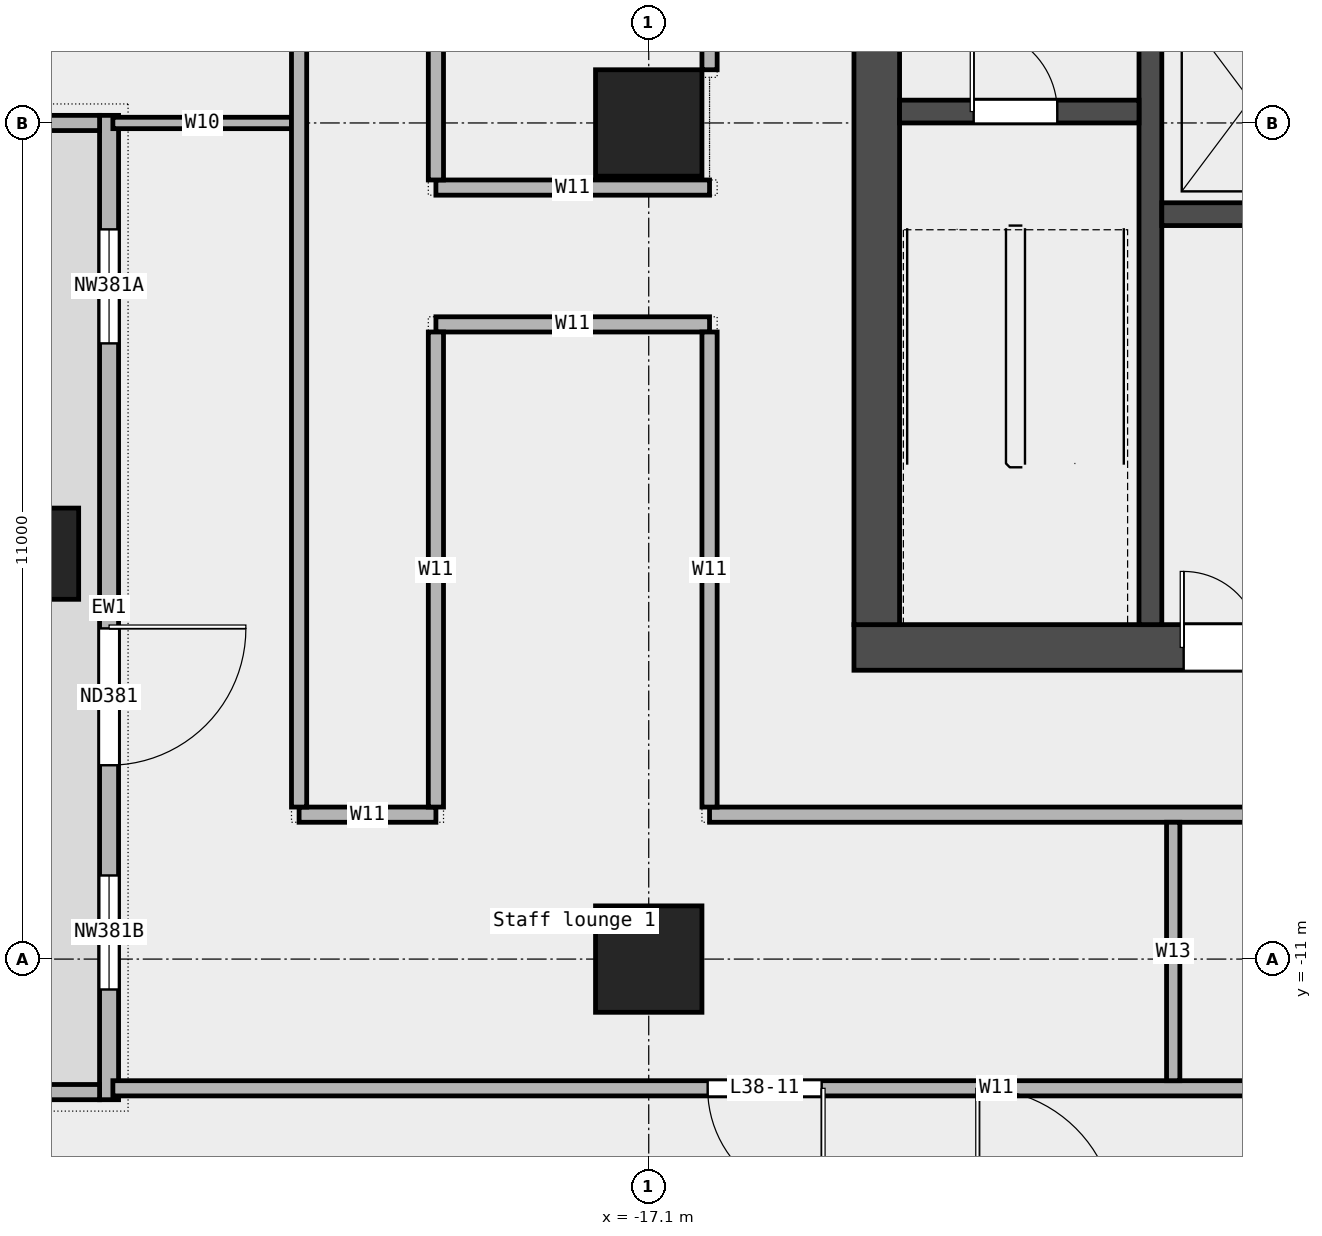
"""IFC4 building model, lengths in metres.
Left out: names, types, materials, properties, quantities, classifications, styles, units other than length and angle.
Written with IfcOpenShell. Run it as: python <this file> out.ifc"""

import sys

from ifc_helpers import new_model, si_unit, direction, frame, frame_2d, origin, origin_2d, place, context, subcontext, project, spatial, rectangle, extrude, element, fill, save


model = new_model("IFC4")
c1 = context("Model", 3, precision=1e-05, world=origin(), true_north=direction((0.0, 1.0)))
c2 = subcontext(c1, "Body", "Model", "MODEL_VIEW")
j1 = project(units=[si_unit("LENGTHUNIT", "METRE"), si_unit("PLANEANGLEUNIT", "RADIAN")], contexts=[c1])
p1 = place(None, origin())
s1 = spatial("IfcSite", under=j1, at=p1, CompositionType="ELEMENT")
p2 = place(p1, origin())
s2 = spatial("IfcBuilding", under=s1, at=p2, CompositionType="ELEMENT")
p3 = place(p2, frame((0.0, 0.0, 185.0)))
s3 = spatial("IfcBuildingStorey", under=s2, at=p3, CompositionType="ELEMENT", Elevation=185.0)
p4 = place(p3, frame((-25.2, -5.667, 0.0), z_axis=(0.0, 0.0, 1.0), x_axis=(1.0, 0.0, 0.0)))
e1 = element("IfcColumn", 1, at=p4, inside=s3, PredefinedType="COLUMN", context=c2, shape_type="SweptSolid", body=[
    extrude(rectangle(XDim=1.2, YDim=1.2, at=origin_2d()), origin(), (0.0, 0.0, 1.0), 3.6),
])
for number, where, z_axis, x_axis in (
    (2, (-17.1, -11.0, 0.0), (0.0, 0.0, 1.0), (1.0, 0.0, 0.0)),
    (3, (-17.1, 0.0, 0.0), (0.0, 0.0, 1.0), (1.0, 0.0, 0.0)),
):
    element("IfcColumn", number, at=place(p3, frame(where, z_axis=z_axis, x_axis=x_axis)), inside=s3, PredefinedType="COLUMN", context=c2, shape_type="SweptSolid", body=[
        extrude(rectangle(XDim=1.4, YDim=1.4, at=origin_2d()), origin(), (0.0, 0.0, 1.0), 3.6),
    ])
p5 = place(p3, frame((-24.2, 0.1, 0.0), z_axis=(0.0, 0.0, 1.0), x_axis=(0.0, -1.0, 0.0)))
e4 = element("IfcWall", 4, at=p5, inside=s3, PredefinedType="STANDARD", context=c2, shape_type="SweptSolid", body=[
    extrude(rectangle(XDim=12.95, YDim=0.25, at=frame_2d((6.475, 0.0))), origin(), (0.0, 0.0, 1.0), 3.6),
])
p6 = place(p5, frame((1.5, 0.0, 0.45)))
e5 = element("IfcOpeningElement", 5, at=p6, cuts=e4, PredefinedType="OPENING", context=c2, shape_type="SweptSolid", body=[
    extrude(rectangle(XDim=1.5, YDim=2.4, at=frame_2d((0.75, 1.2))), frame((0.0, 0.137, 0.0), z_axis=(0.0, -1.0, 0.0), x_axis=(1.0, 0.0, 0.0)), (0.0, 0.0, 1.0), 0.274),
])
p7 = place(p5, frame((6.75, 0.0, 0.0)))
e6 = element("IfcOpeningElement", 6, at=p7, cuts=e4, PredefinedType="OPENING", context=c2, shape_type="SweptSolid", body=[
    extrude(rectangle(XDim=1.8, YDim=2.4, at=frame_2d((0.9, 1.2))), frame((0.0, 0.137, 0.0), z_axis=(0.0, -1.0, 0.0), x_axis=(1.0, 0.0, 0.0)), (0.0, 0.0, 1.0), 0.274),
])
p8 = place(p5, frame((10.0, 0.0, 0.45)))
e7 = element("IfcOpeningElement", 7, at=p8, cuts=e4, PredefinedType="OPENING", context=c2, shape_type="SweptSolid", body=[
    extrude(rectangle(XDim=1.5, YDim=2.4, at=frame_2d((0.75, 1.2))), frame((0.0, 0.137, 0.0), z_axis=(0.0, -1.0, 0.0), x_axis=(1.0, 0.0, 0.0)), (0.0, 0.0, 1.0), 0.274),
])
for number, where, z_axis, x_axis in (
    (8, (-26.2, 0.0, 0.0), (0.0, 0.0, 1.0), (1.0, 0.0, 0.0)),
    (9, (-26.2, -12.75, 0.0), (0.0, 0.0, 1.0), (1.0, 0.0, 0.0)),
):
    element("IfcWall", number, at=place(p3, frame(where, z_axis=z_axis, x_axis=x_axis)), inside=s3, PredefinedType="STANDARD", context=c2, shape_type="SweptSolid", body=[
        extrude(rectangle(XDim=1.875, YDim=0.2, at=frame_2d((0.938, 0.0))), origin(), (0.0, 0.0, 1.0), 3.6),
    ])
p9 = place(p3, frame((-24.15, -12.7, 0.0), z_axis=(0.0, 0.0, 1.0), x_axis=(1.0, 0.0, 0.0)))
e10 = element("IfcWall", 10, at=p9, inside=s3, PredefinedType="PARTITIONING", context=c2, shape_type="SweptSolid", body=[
    extrude(rectangle(XDim=23.25, YDim=0.2, at=frame_2d((11.625, 0.0))), origin(), (0.0, 0.0, 1.0), 3.6),
])
p10 = place(p9, frame((19.35, 0.0, 0.0)))
e11 = element("IfcOpeningElement", 11, at=p10, cuts=e10, PredefinedType="OPENING", context=c2, shape_type="SweptSolid", body=[
    extrude(rectangle(XDim=0.9, YDim=2.1, at=frame_2d((0.45, 1.05))), frame((0.0, 0.112, 0.0), z_axis=(0.0, -1.0, 0.0), x_axis=(1.0, 0.0, 0.0)), (0.0, 0.0, 1.0), 0.224),
])
p11 = place(p9, frame((7.825, 0.0, 0.0)))
e12 = element("IfcOpeningElement", 12, at=p11, cuts=e10, PredefinedType="OPENING", context=c2, shape_type="SweptSolid", body=[
    extrude(rectangle(XDim=1.5, YDim=2.1, at=frame_2d((0.75, 1.05))), frame((0.0, 0.112, 0.0), z_axis=(0.0, -1.0, 0.0), x_axis=(1.0, 0.0, 0.0)), (0.0, 0.0, 1.0), 0.224),
])
p12 = place(p3, frame((-21.7, -9.1, 0.0), z_axis=(0.0, 0.0, 1.0), x_axis=(1.0, 0.0, 0.0)))
e13 = element("IfcWall", 13, at=p12, inside=s3, PredefinedType="PARTITIONING", context=c2, shape_type="SweptSolid", body=[
    extrude(rectangle(XDim=1.8, YDim=0.2, at=frame_2d((0.9, 0.0))), origin(), (0.0, 0.0, 1.0), 3.6),
])
p13 = place(p3, frame((-16.3, -9.1, 0.0), z_axis=(0.0, 0.0, 1.0), x_axis=(1.0, 0.0, 0.0)))
e14 = element("IfcWall", 14, at=p13, inside=s3, PredefinedType="PARTITIONING", context=c2, shape_type="SweptSolid", body=[
    extrude(rectangle(XDim=15.4, YDim=0.2, at=frame_2d((7.7, 0.0))), origin(), (0.0, 0.0, 1.0), 3.6),
])
for number, where, z_axis, x_axis in (
    (15, (-19.9, -2.65, 0.0), (0.0, 0.0, 1.0), (1.0, 0.0, 0.0)),
    (16, (-19.9, -0.85, 0.0), (0.0, 0.0, 1.0), (1.0, 0.0, 0.0)),
):
    element("IfcWall", number, at=place(p3, frame(where, z_axis=z_axis, x_axis=x_axis)), inside=s3, PredefinedType="PARTITIONING", context=c2, shape_type="SweptSolid", body=[
        extrude(rectangle(XDim=3.6, YDim=0.2, at=frame_2d((1.8, 0.0))), origin(), (0.0, 0.0, 1.0), 3.6),
    ])
p14 = place(p3, frame((-24.15, 0.0, 0.0), z_axis=(0.0, 0.0, 1.0), x_axis=(1.0, 0.0, 0.0)))
e17 = element("IfcWall", 17, at=p14, inside=s3, PredefinedType="PARTITIONING", context=c2, shape_type="SweptSolid", body=[
    extrude(rectangle(XDim=2.35, YDim=0.15, at=frame_2d((1.175, 0.0))), origin(), (0.0, 0.0, 1.0), 3.6),
])
p15 = place(p3, frame((-21.7, -9.0, 0.0), z_axis=(0.0, 0.0, 1.0), x_axis=(0.0, 1.0, 0.0)))
e18 = element("IfcWall", 18, at=p15, inside=s3, PredefinedType="PARTITIONING", context=c2, shape_type="SweptSolid", body=[
    extrude(rectangle(XDim=24.3, YDim=0.2, at=frame_2d((12.15, 0.0))), origin(), (0.0, 0.0, 1.0), 3.6),
])
p16 = place(p15, frame((16.05, 0.0, 0.0)))
e19 = element("IfcOpeningElement", 19, at=p16, cuts=e18, PredefinedType="OPENING", context=c2, shape_type="SweptSolid", body=[
    extrude(rectangle(XDim=1.2, YDim=2.1, at=frame_2d((0.6, 1.05))), frame((0.0, 0.112, 0.0), z_axis=(0.0, -1.0, 0.0), x_axis=(1.0, 0.0, 0.0)), (0.0, 0.0, 1.0), 0.224),
])
p17 = place(p3, frame((-19.9, -9.0, 0.0), z_axis=(0.0, 0.0, 1.0), x_axis=(0.0, 1.0, 0.0)))
e20 = element("IfcWall", 20, at=p17, inside=s3, PredefinedType="PARTITIONING", context=c2, shape_type="SweptSolid", body=[
    extrude(rectangle(XDim=6.25, YDim=0.2, at=frame_2d((3.125, 0.0))), origin(), (0.0, 0.0, 1.0), 3.6),
])
p18 = place(p3, frame((-19.9, -0.75, 0.0), z_axis=(0.0, 0.0, 1.0), x_axis=(0.0, 1.0, 0.0)))
e21 = element("IfcWall", 21, at=p18, inside=s3, PredefinedType="PARTITIONING", context=c2, shape_type="SweptSolid", body=[
    extrude(rectangle(XDim=16.05, YDim=0.2, at=frame_2d((8.025, 0.0))), origin(), (0.0, 0.0, 1.0), 3.6),
])
p19 = place(p3, frame((-16.3, -9.0, 0.0), z_axis=(0.0, 0.0, 1.0), x_axis=(0.0, 1.0, 0.0)))
e22 = element("IfcWall", 22, at=p19, inside=s3, PredefinedType="PARTITIONING", context=c2, shape_type="SweptSolid", body=[
    extrude(rectangle(XDim=6.25, YDim=0.2, at=frame_2d((3.125, 0.0))), origin(), (0.0, 0.0, 1.0), 3.6),
])
p20 = place(p3, frame((-16.3, 0.7, 0.0), z_axis=(0.0, 0.0, 1.0), x_axis=(0.0, 1.0, 0.0)))
e23 = element("IfcWall", 23, at=p20, inside=s3, PredefinedType="PARTITIONING", context=c2, shape_type="SweptSolid", body=[
    extrude(rectangle(XDim=9.6, YDim=0.2, at=frame_2d((4.8, 0.0))), origin(), (0.0, 0.0, 1.0), 3.6),
])
p21 = place(p20, frame((1.73, 0.0, 0.0)))
e24 = element("IfcOpeningElement", 24, at=p21, cuts=e23, PredefinedType="OPENING", context=c2, shape_type="SweptSolid", body=[
    extrude(rectangle(XDim=0.9, YDim=2.1, at=frame_2d((0.45, 1.05))), frame((0.0, 0.112, 0.0), z_axis=(0.0, -1.0, 0.0), x_axis=(1.0, 0.0, 0.0)), (0.0, 0.0, 1.0), 0.224),
])
p22 = place(p20, frame((6.353, 0.0, 0.0)))
e25 = element("IfcOpeningElement", 25, at=p22, cuts=e23, PredefinedType="OPENING", context=c2, shape_type="SweptSolid", body=[
    extrude(rectangle(XDim=0.9, YDim=2.1, at=frame_2d((0.45, 1.05))), frame((0.0, 0.112, 0.0), z_axis=(0.0, -1.0, 0.0), x_axis=(1.0, 0.0, 0.0)), (0.0, 0.0, 1.0), 0.224),
])
p23 = place(p3, frame((-10.2, -12.6, 0.0), z_axis=(0.0, 0.0, 1.0), x_axis=(0.0, 1.0, 0.0)))
e26 = element("IfcWall", 26, at=p23, inside=s3, PredefinedType="PARTITIONING", context=c2, shape_type="SweptSolid", body=[
    extrude(rectangle(XDim=3.4, YDim=0.175, at=frame_2d((1.7, 0.0))), origin(), (0.0, 0.0, 1.0), 3.6),
])
p24 = place(p3, frame((-14.4, -6.9, 0.0), z_axis=(0.0, 0.0, 1.0), x_axis=(1.0, 0.0, 0.0)))
e27 = element("IfcWall", 27, at=p24, inside=s3, PredefinedType="SHEAR", context=c2, shape_type="SweptSolid", body=[
    extrude(rectangle(XDim=28.8, YDim=0.6, at=frame_2d((14.4, 0.0))), origin(), (0.0, 0.0, 1.0), 3.7),
])
p25 = place(p24, frame((4.337, 0.0, 0.0)))
e28 = element("IfcOpeningElement", 28, at=p25, cuts=e27, PredefinedType="OPENING", context=c2, shape_type="SweptSolid", body=[
    extrude(rectangle(XDim=1.0, YDim=2.1, at=frame_2d((0.5, 1.05))), frame((0.0, 0.312, 0.0), z_axis=(0.0, -1.0, 0.0), x_axis=(1.0, 0.0, 0.0)), (0.0, 0.0, 1.0), 0.624),
])
p26 = place(p24, frame((8.925, 0.0, 0.0)))
e29 = element("IfcOpeningElement", 29, at=p26, cuts=e27, PredefinedType="OPENING", context=c2, shape_type="SweptSolid", body=[
    extrude(rectangle(XDim=1.2, YDim=2.1, at=frame_2d((0.6, 1.05))), frame((0.0, 0.312, 0.0), z_axis=(0.0, -1.0, 0.0), x_axis=(1.0, 0.0, 0.0)), (0.0, 0.0, 1.0), 0.624),
])
p27 = place(p24, frame((13.712, 0.0, 0.0)))
e30 = element("IfcOpeningElement", 30, at=p27, cuts=e27, PredefinedType="OPENING", context=c2, shape_type="SweptSolid", body=[
    extrude(rectangle(XDim=1.0, YDim=2.1, at=frame_2d((0.5, 1.05))), frame((0.0, 0.312, 0.0), z_axis=(0.0, -1.0, 0.0), x_axis=(1.0, 0.0, 0.0)), (0.0, 0.0, 1.0), 0.624),
])
p28 = place(p24, frame((15.587, 0.0, 0.0)))
e31 = element("IfcOpeningElement", 31, at=p28, cuts=e27, PredefinedType="OPENING", context=c2, shape_type="SweptSolid", body=[
    extrude(rectangle(XDim=1.0, YDim=2.1, at=frame_2d((0.5, 1.05))), frame((0.0, 0.312, 0.0), z_axis=(0.0, -1.0, 0.0), x_axis=(1.0, 0.0, 0.0)), (0.0, 0.0, 1.0), 0.624),
])
p29 = place(p24, frame((18.75, 0.0, 0.0)))
e32 = element("IfcOpeningElement", 32, at=p29, cuts=e27, PredefinedType="OPENING", context=c2, shape_type="SweptSolid", body=[
    extrude(rectangle(XDim=1.8, YDim=2.1, at=frame_2d((0.9, 1.05))), frame((0.0, 0.312, 0.0), z_axis=(0.0, -1.0, 0.0), x_axis=(1.0, 0.0, 0.0)), (0.0, 0.0, 1.0), 0.624),
])
p30 = place(p24, frame((23.087, 0.0, 0.0)))
e33 = element("IfcOpeningElement", 33, at=p30, cuts=e27, PredefinedType="OPENING", context=c2, shape_type="SweptSolid", body=[
    extrude(rectangle(XDim=1.0, YDim=2.1, at=frame_2d((0.5, 1.05))), frame((0.0, 0.312, 0.0), z_axis=(0.0, -1.0, 0.0), x_axis=(1.0, 0.0, 0.0)), (0.0, 0.0, 1.0), 0.624),
])
p31 = place(p3, frame((-14.1, -6.6, 0.0), z_axis=(0.0, 0.0, 1.0), x_axis=(0.0, 1.0, 0.0)))
e34 = element("IfcWall", 34, at=p31, inside=s3, PredefinedType="SHEAR", context=c2, shape_type="SweptSolid", body=[
    extrude(rectangle(XDim=19.5, YDim=0.6, at=frame_2d((9.75, 0.0))), origin(), (0.0, 0.0, 1.0), 3.7),
])
p32 = place(p31, frame((9.3, 0.0, 0.0)))
e35 = element("IfcOpeningElement", 35, at=p32, cuts=e34, PredefinedType="OPENING", context=c2, shape_type="SweptSolid", body=[
    extrude(rectangle(XDim=1.8, YDim=2.1, at=frame_2d((0.9, 1.05))), frame((0.0, 0.312, 0.0), z_axis=(0.0, -1.0, 0.0), x_axis=(1.0, 0.0, 0.0)), (0.0, 0.0, 1.0), 0.624),
])
p33 = place(p3, frame((-10.5, -6.6, 0.0), z_axis=(0.0, 0.0, 1.0), x_axis=(0.0, 1.0, 0.0)))
e36 = element("IfcWall", 36, at=p33, inside=s3, PredefinedType="SHEAR", context=c2, shape_type="SweptSolid", body=[
    extrude(rectangle(XDim=8.55, YDim=0.3, at=frame_2d((4.275, 0.0))), origin(), (0.0, 0.0, 1.0), 3.7),
])
p34 = place(p3, frame((-13.8, 0.15, 0.0), z_axis=(0.0, 0.0, 1.0), x_axis=(1.0, 0.0, 0.0)))
e37 = element("IfcWall", 37, at=p34, inside=s3, PredefinedType="SOLIDWALL", context=c2, shape_type="SweptSolid", body=[
    extrude(rectangle(XDim=3.15, YDim=0.3, at=frame_2d((1.575, 0.0))), origin(), (0.0, 0.0, 1.0), 3.7),
])
p35 = place(p34, frame((0.975, 0.0, 0.0)))
e38 = element("IfcOpeningElement", 38, at=p35, cuts=e37, PredefinedType="OPENING", context=c2, shape_type="SweptSolid", body=[
    extrude(rectangle(XDim=1.1, YDim=2.1, at=frame_2d((0.55, 1.05))), frame((0.0, 0.162, 0.0), z_axis=(0.0, -1.0, 0.0), x_axis=(1.0, 0.0, 0.0)), (0.0, 0.0, 1.0), 0.324),
])
p36 = place(p3, frame((-10.35, -1.2, 0.0), z_axis=(0.0, 0.0, 1.0), x_axis=(1.0, 0.0, 0.0)))
e39 = element("IfcWall", 39, at=p36, inside=s3, PredefinedType="SOLIDWALL", context=c2, shape_type="SweptSolid", body=[
    extrude(rectangle(XDim=20.7, YDim=0.3, at=frame_2d((10.35, 0.0))), origin(), (0.0, 0.0, 1.0), 3.7),
])
p37 = place(p6, origin())
e40 = element("IfcWindow", 40, at=p37, inside=s3, PartitioningType="SINGLE_PANEL", PredefinedType="WINDOW", context=c2, shape_type="SweptSolid", body=[
    extrude(rectangle(XDim=1.5, YDim=2.4, at=frame_2d((0.75, 1.2))), frame((0.0, 0.03, 0.0), z_axis=(0.0, -1.0, 0.0), x_axis=(1.0, 0.0, 0.0)), (0.0, 0.0, 1.0), 0.06),
])
fill(e5, e40)
p38 = place(p7, origin())
e41 = element("IfcDoor", 41, at=p38, inside=s3, OperationType="DOUBLE_DOOR_SINGLE_SWING", PredefinedType="DOOR", context=c2, shape_type="SweptSolid", body=[
    extrude(rectangle(XDim=1.8, YDim=2.4, at=frame_2d((0.9, 1.2))), frame((0.0, 0.025, 0.0), z_axis=(0.0, -1.0, 0.0), x_axis=(1.0, 0.0, 0.0)), (0.0, 0.0, 1.0), 0.05),
])
fill(e6, e41)
p39 = place(p8, origin())
e42 = element("IfcWindow", 42, at=p39, inside=s3, PartitioningType="SINGLE_PANEL", PredefinedType="WINDOW", context=c2, shape_type="SweptSolid", body=[
    extrude(rectangle(XDim=1.5, YDim=2.4, at=frame_2d((0.75, 1.2))), frame((0.0, 0.03, 0.0), z_axis=(0.0, -1.0, 0.0), x_axis=(1.0, 0.0, 0.0)), (0.0, 0.0, 1.0), 0.06),
])
fill(e7, e42)
p40 = place(p11, origin())
e43 = element("IfcDoor", 43, at=p40, inside=s3, OperationType="DOUBLE_DOOR_SINGLE_SWING", PredefinedType="DOOR", context=c2, shape_type="SweptSolid", body=[
    extrude(rectangle(XDim=1.5, YDim=2.1, at=frame_2d((0.75, 1.05))), frame((0.0, 0.025, 0.0), z_axis=(0.0, -1.0, 0.0), x_axis=(1.0, 0.0, 0.0)), (0.0, 0.0, 1.0), 0.05),
])
fill(e12, e43)
p41 = place(p35, origin())
e44 = element("IfcDoor", 44, at=p41, inside=s3, OperationType="SINGLE_SWING_LEFT", PredefinedType="DOOR", context=c2, shape_type="SweptSolid", body=[
    extrude(rectangle(XDim=1.1, YDim=2.1, at=frame_2d((0.55, 1.05))), frame((0.0, 0.025, 0.0), z_axis=(0.0, -1.0, 0.0), x_axis=(1.0, 0.0, 0.0)), (0.0, 0.0, 1.0), 0.05),
])
fill(e38, e44)
p42 = place(p25, origin())
e45 = element("IfcDoor", 45, at=p42, inside=s3, OperationType="SINGLE_SWING_LEFT", PredefinedType="DOOR", context=c2, shape_type="SweptSolid", body=[
    extrude(rectangle(XDim=1.0, YDim=2.1, at=frame_2d((0.5, 1.05))), frame((0.0, 0.025, 0.0), z_axis=(0.0, -1.0, 0.0), x_axis=(1.0, 0.0, 0.0)), (0.0, 0.0, 1.0), 0.05),
])
fill(e28, e45)
save(model, sys.argv[1])
